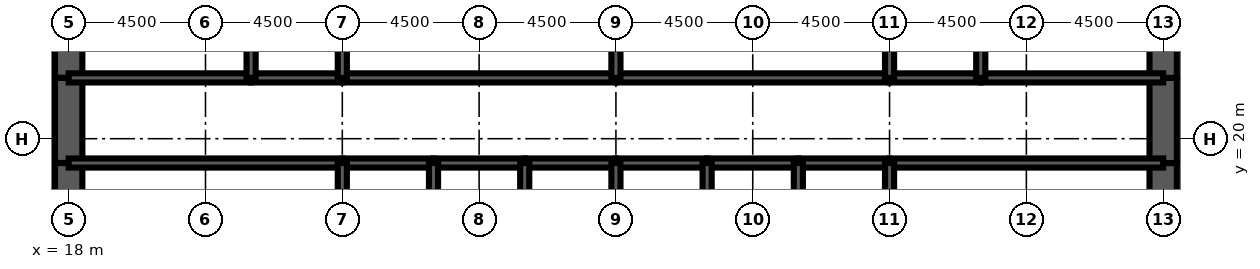
"""IFC4 building model, lengths in metres.
Left out: names, types, materials, properties, quantities, classifications, styles, units other than length and angle.
Written with IfcOpenShell. Run it as: python <this file> out.ifc"""

import sys

from ifc_helpers import new_model, si_unit, direction, frame, frame_2d, origin, place, context, subcontext, project, spatial, rectangle, extrude, element, fill, save


model = new_model("IFC4")
c1 = context("Model", 3, precision=1e-05, world=origin(), true_north=direction((0.0, 1.0)))
c2 = subcontext(c1, "Body", "Model", "MODEL_VIEW")
j1 = project(units=[si_unit("LENGTHUNIT", "METRE"), si_unit("PLANEANGLEUNIT", "RADIAN")], contexts=[c1])
p1 = place(None, origin())
s1 = spatial("IfcSite", under=j1, at=p1, CompositionType="ELEMENT")
p2 = place(p1, origin())
s2 = spatial("IfcBuilding", under=s1, at=p2, CompositionType="ELEMENT")
p3 = place(p2, frame((0.0, 0.0, 27.5)))
s3 = spatial("IfcBuildingStorey", under=s2, at=p3, CompositionType="ELEMENT", Elevation=27.5)
p4 = place(p3, frame((18.0, 26.0, 0.0), z_axis=(0.0, 0.0, 1.0), x_axis=(0.0, -1.0, 0.0)))
e1 = element("IfcWall", 1, at=p4, inside=s3, PredefinedType="SHEAR", context=c2, shape_type="SweptSolid", body=[
    extrude(rectangle(XDim=4.0, YDim=0.9, at=frame_2d((2.0, 0.0))), origin(), (0.0, 0.0, 1.0), 4.5),
])
p5 = place(p3, frame((18.0, 22.0, 0.0), z_axis=(0.0, 0.0, 1.0), x_axis=(0.0, -1.0, 0.0)))
e2 = element("IfcWall", 2, at=p5, inside=s3, PredefinedType="SHEAR", context=c2, shape_type="SweptSolid", body=[
    extrude(rectangle(XDim=2.8, YDim=0.9, at=frame_2d((1.4, 0.0))), origin(), (0.0, 0.0, 1.0), 4.5),
])
p6 = place(p5, frame((0.6, 0.0, 0.0)))
e3 = element("IfcOpeningElement", 3, at=p6, cuts=e2, PredefinedType="OPENING", context=c2, shape_type="SweptSolid", body=[
    extrude(rectangle(XDim=1.8, YDim=2.1, at=frame_2d((0.9, 1.05))), frame((0.0, 0.46, 0.0), z_axis=(0.0, -1.0, 0.0), x_axis=(1.0, 0.0, 0.0)), (0.0, 0.0, 1.0), 0.92),
])
for number, where, z_axis, x_axis in (
    (4, (18.0, 19.2, 0.0), (0.0, 0.0, 1.0), (0.0, -1.0, 0.0)),
    (5, (54.0, 16.0, 0.0), (0.0, 0.0, 1.0), (0.0, 1.0, 0.0)),
):
    element("IfcWall", number, at=place(p3, frame(where, z_axis=z_axis, x_axis=x_axis)), inside=s3, PredefinedType="SHEAR", context=c2, shape_type="SweptSolid", body=[
        extrude(rectangle(XDim=3.2, YDim=0.9, at=frame_2d((1.6, 0.0))), origin(), (0.0, 0.0, 1.0), 4.5),
    ])
p7 = place(p3, frame((54.0, 19.2, 0.0), z_axis=(0.0, 0.0, 1.0), x_axis=(0.0, 1.0, 0.0)))
e6 = element("IfcWall", 6, at=p7, inside=s3, PredefinedType="SHEAR", context=c2, shape_type="SweptSolid", body=[
    extrude(rectangle(XDim=2.8, YDim=0.9, at=frame_2d((1.4, 0.0))), origin(), (0.0, 0.0, 1.0), 4.5),
])
p8 = place(p7, frame((0.4, 0.0, 0.0)))
e7 = element("IfcOpeningElement", 7, at=p8, cuts=e6, PredefinedType="OPENING", context=c2, shape_type="SweptSolid", body=[
    extrude(rectangle(XDim=1.8, YDim=2.1, at=frame_2d((0.9, 1.05))), frame((0.0, 0.46, 0.0), z_axis=(0.0, -1.0, 0.0), x_axis=(1.0, 0.0, 0.0)), (0.0, 0.0, 1.0), 0.92),
])
p9 = place(p3, frame((54.0, 22.0, 0.0), z_axis=(0.0, 0.0, 1.0), x_axis=(0.0, 1.0, 0.0)))
e8 = element("IfcWall", 8, at=p9, inside=s3, PredefinedType="SHEAR", context=c2, shape_type="SweptSolid", body=[
    extrude(rectangle(XDim=4.0, YDim=0.9, at=frame_2d((2.0, 0.0))), origin(), (0.0, 0.0, 1.0), 4.5),
])
p10 = place(p3, frame((18.0, 19.2, 0.0), z_axis=(0.0, 0.0, 1.0), x_axis=(1.0, 0.0, 0.0)))
e9 = element("IfcWall", 9, at=p10, inside=s3, PredefinedType="SOLIDWALL", context=c2, shape_type="SweptSolid", body=[
    extrude(rectangle(XDim=9.0, YDim=0.3, at=frame_2d((4.5, 0.0))), origin(), (0.0, 0.0, 1.0), 4.5),
])
p11 = place(p10, frame((0.65, 0.0, 0.0)))
e10 = element("IfcOpeningElement", 10, at=p11, cuts=e9, PredefinedType="OPENING", context=c2, shape_type="SweptSolid", body=[
    extrude(rectangle(XDim=1.0, YDim=2.1, at=frame_2d((0.5, 1.05))), frame((0.0, 0.16, 0.0), z_axis=(0.0, -1.0, 0.0), x_axis=(1.0, 0.0, 0.0)), (0.0, 0.0, 1.0), 0.32),
])
p12 = place(p3, frame((27.0, 19.2, 0.0), z_axis=(0.0, 0.0, 1.0), x_axis=(1.0, 0.0, 0.0)))
e11 = element("IfcWall", 11, at=p12, inside=s3, PredefinedType="SOLIDWALL", context=c2, shape_type="SweptSolid", body=[
    extrude(rectangle(XDim=3.0, YDim=0.3, at=frame_2d((1.5, 0.0))), origin(), (0.0, 0.0, 1.0), 4.5),
])
p13 = place(p12, frame((0.95, 0.0, 0.0)))
e12 = element("IfcOpeningElement", 12, at=p13, cuts=e11, PredefinedType="OPENING", context=c2, shape_type="SweptSolid", body=[
    extrude(rectangle(XDim=1.1, YDim=2.2, at=frame_2d((0.55, 1.1))), frame((0.0, 0.16, 0.0), z_axis=(0.0, -1.0, 0.0), x_axis=(1.0, 0.0, 0.0)), (0.0, 0.0, 1.0), 0.32),
])
p14 = place(p3, frame((30.0, 19.2, 0.0), z_axis=(0.0, 0.0, 1.0), x_axis=(1.0, 0.0, 0.0)))
e13 = element("IfcWall", 13, at=p14, inside=s3, PredefinedType="SOLIDWALL", context=c2, shape_type="SweptSolid", body=[
    extrude(rectangle(XDim=3.0, YDim=0.3, at=frame_2d((1.5, 0.0))), origin(), (0.0, 0.0, 1.0), 4.5),
])
p15 = place(p14, frame((0.95, 0.0, 0.0)))
e14 = element("IfcOpeningElement", 14, at=p15, cuts=e13, PredefinedType="OPENING", context=c2, shape_type="SweptSolid", body=[
    extrude(rectangle(XDim=1.1, YDim=2.2, at=frame_2d((0.55, 1.1))), frame((0.0, 0.16, 0.0), z_axis=(0.0, -1.0, 0.0), x_axis=(1.0, 0.0, 0.0)), (0.0, 0.0, 1.0), 0.32),
])
p16 = place(p3, frame((33.0, 19.2, 0.0), z_axis=(0.0, 0.0, 1.0), x_axis=(1.0, 0.0, 0.0)))
e15 = element("IfcWall", 15, at=p16, inside=s3, PredefinedType="SOLIDWALL", context=c2, shape_type="SweptSolid", body=[
    extrude(rectangle(XDim=3.0, YDim=0.3, at=frame_2d((1.5, 0.0))), origin(), (0.0, 0.0, 1.0), 4.5),
])
p17 = place(p16, frame((0.95, 0.0, 0.0)))
e16 = element("IfcOpeningElement", 16, at=p17, cuts=e15, PredefinedType="OPENING", context=c2, shape_type="SweptSolid", body=[
    extrude(rectangle(XDim=1.1, YDim=2.2, at=frame_2d((0.55, 1.1))), frame((0.0, 0.16, 0.0), z_axis=(0.0, -1.0, 0.0), x_axis=(1.0, 0.0, 0.0)), (0.0, 0.0, 1.0), 0.32),
])
p18 = place(p3, frame((36.0, 19.2, 0.0), z_axis=(0.0, 0.0, 1.0), x_axis=(1.0, 0.0, 0.0)))
e17 = element("IfcWall", 17, at=p18, inside=s3, PredefinedType="SOLIDWALL", context=c2, shape_type="SweptSolid", body=[
    extrude(rectangle(XDim=3.0, YDim=0.3, at=frame_2d((1.5, 0.0))), origin(), (0.0, 0.0, 1.0), 4.5),
])
p19 = place(p18, frame((0.95, 0.0, 0.0)))
e18 = element("IfcOpeningElement", 18, at=p19, cuts=e17, PredefinedType="OPENING", context=c2, shape_type="SweptSolid", body=[
    extrude(rectangle(XDim=1.1, YDim=2.2, at=frame_2d((0.55, 1.1))), frame((0.0, 0.16, 0.0), z_axis=(0.0, -1.0, 0.0), x_axis=(1.0, 0.0, 0.0)), (0.0, 0.0, 1.0), 0.32),
])
for number, where, z_axis, x_axis in (
    (19, (39.0, 19.2, 0.0), (0.0, 0.0, 1.0), (1.0, 0.0, 0.0)),
    (20, (42.0, 19.2, 0.0), (0.0, 0.0, 1.0), (1.0, 0.0, 0.0)),
):
    element("IfcWall", number, at=place(p3, frame(where, z_axis=z_axis, x_axis=x_axis)), inside=s3, PredefinedType="SOLIDWALL", context=c2, shape_type="SweptSolid", body=[
        extrude(rectangle(XDim=3.0, YDim=0.3, at=frame_2d((1.5, 0.0))), origin(), (0.0, 0.0, 1.0), 4.5),
    ])
p20 = place(p3, frame((45.0, 19.2, 0.0), z_axis=(0.0, 0.0, 1.0), x_axis=(1.0, 0.0, 0.0)))
e21 = element("IfcWall", 21, at=p20, inside=s3, PredefinedType="SOLIDWALL", context=c2, shape_type="SweptSolid", body=[
    extrude(rectangle(XDim=9.0, YDim=0.3, at=frame_2d((4.5, 0.0))), origin(), (0.0, 0.0, 1.0), 4.5),
])
p21 = place(p20, frame((7.35, 0.0, 0.0)))
e22 = element("IfcOpeningElement", 22, at=p21, cuts=e21, PredefinedType="OPENING", context=c2, shape_type="SweptSolid", body=[
    extrude(rectangle(XDim=1.0, YDim=2.1, at=frame_2d((0.5, 1.05))), frame((0.0, 0.16, 0.0), z_axis=(0.0, -1.0, 0.0), x_axis=(1.0, 0.0, 0.0)), (0.0, 0.0, 1.0), 0.32),
])
p22 = place(p3, frame((18.0, 22.0, 0.0), z_axis=(0.0, 0.0, 1.0), x_axis=(1.0, 0.0, 0.0)))
e23 = element("IfcWall", 23, at=p22, inside=s3, PredefinedType="SOLIDWALL", context=c2, shape_type="SweptSolid", body=[
    extrude(rectangle(XDim=6.0, YDim=0.3, at=frame_2d((3.0, 0.0))), origin(), (0.0, 0.0, 1.0), 4.5),
])
p23 = place(p22, frame((4.4, 0.0, 0.0)))
e24 = element("IfcOpeningElement", 24, at=p23, cuts=e23, PredefinedType="OPENING", context=c2, shape_type="SweptSolid", body=[
    extrude(rectangle(XDim=1.0, YDim=2.1, at=frame_2d((0.5, 1.05))), frame((0.0, 0.16, 0.0), z_axis=(0.0, -1.0, 0.0), x_axis=(1.0, 0.0, 0.0)), (0.0, 0.0, 1.0), 0.32),
])
p24 = place(p22, frame((0.85, 0.0, 0.0)))
e25 = element("IfcOpeningElement", 25, at=p24, cuts=e23, PredefinedType="OPENING", context=c2, shape_type="SweptSolid", body=[
    extrude(rectangle(XDim=1.0, YDim=2.1, at=frame_2d((0.5, 1.05))), frame((0.0, 0.16, 0.0), z_axis=(0.0, -1.0, 0.0), x_axis=(1.0, 0.0, 0.0)), (0.0, 0.0, 1.0), 0.32),
])
p25 = place(p3, frame((24.0, 22.0, 0.0), z_axis=(0.0, 0.0, 1.0), x_axis=(1.0, 0.0, 0.0)))
e26 = element("IfcWall", 26, at=p25, inside=s3, PredefinedType="SOLIDWALL", context=c2, shape_type="SweptSolid", body=[
    extrude(rectangle(XDim=3.0, YDim=0.3, at=frame_2d((1.5, 0.0))), origin(), (0.0, 0.0, 1.0), 4.5),
])
p26 = place(p25, frame((1.0, 0.0, 0.0)))
e27 = element("IfcOpeningElement", 27, at=p26, cuts=e26, PredefinedType="OPENING", context=c2, shape_type="SweptSolid", body=[
    extrude(rectangle(XDim=1.0, YDim=2.1, at=frame_2d((0.5, 1.05))), frame((0.0, 0.16, 0.0), z_axis=(0.0, -1.0, 0.0), x_axis=(1.0, 0.0, 0.0)), (0.0, 0.0, 1.0), 0.32),
])
p27 = place(p3, frame((27.0, 22.0, 0.0), z_axis=(0.0, 0.0, 1.0), x_axis=(1.0, 0.0, 0.0)))
e28 = element("IfcWall", 28, at=p27, inside=s3, PredefinedType="SOLIDWALL", context=c2, shape_type="SweptSolid", body=[
    extrude(rectangle(XDim=9.0, YDim=0.3, at=frame_2d((4.5, 0.0))), origin(), (0.0, 0.0, 1.0), 4.5),
])
p28 = place(p27, frame((4.0, 0.0, 0.0)))
e29 = element("IfcOpeningElement", 29, at=p28, cuts=e28, PredefinedType="OPENING", context=c2, shape_type="SweptSolid", body=[
    extrude(rectangle(XDim=1.0, YDim=2.1, at=frame_2d((0.5, 1.05))), frame((0.0, 0.16, 0.0), z_axis=(0.0, -1.0, 0.0), x_axis=(1.0, 0.0, 0.0)), (0.0, 0.0, 1.0), 0.32),
])
p29 = place(p3, frame((36.0, 22.0, 0.0), z_axis=(0.0, 0.0, 1.0), x_axis=(1.0, 0.0, 0.0)))
e30 = element("IfcWall", 30, at=p29, inside=s3, PredefinedType="SOLIDWALL", context=c2, shape_type="SweptSolid", body=[
    extrude(rectangle(XDim=9.0, YDim=0.3, at=frame_2d((4.5, 0.0))), origin(), (0.0, 0.0, 1.0), 4.5),
])
p30 = place(p29, frame((4.0, 0.0, 0.0)))
e31 = element("IfcOpeningElement", 31, at=p30, cuts=e30, PredefinedType="OPENING", context=c2, shape_type="SweptSolid", body=[
    extrude(rectangle(XDim=1.0, YDim=2.1, at=frame_2d((0.5, 1.05))), frame((0.0, 0.16, 0.0), z_axis=(0.0, -1.0, 0.0), x_axis=(1.0, 0.0, 0.0)), (0.0, 0.0, 1.0), 0.32),
])
p31 = place(p3, frame((45.0, 22.0, 0.0), z_axis=(0.0, 0.0, 1.0), x_axis=(1.0, 0.0, 0.0)))
e32 = element("IfcWall", 32, at=p31, inside=s3, PredefinedType="SOLIDWALL", context=c2, shape_type="SweptSolid", body=[
    extrude(rectangle(XDim=3.0, YDim=0.3, at=frame_2d((1.5, 0.0))), origin(), (0.0, 0.0, 1.0), 4.5),
])
p32 = place(p31, frame((1.0, 0.0, 0.0)))
e33 = element("IfcOpeningElement", 33, at=p32, cuts=e32, PredefinedType="OPENING", context=c2, shape_type="SweptSolid", body=[
    extrude(rectangle(XDim=1.0, YDim=2.1, at=frame_2d((0.5, 1.05))), frame((0.0, 0.16, 0.0), z_axis=(0.0, -1.0, 0.0), x_axis=(1.0, 0.0, 0.0)), (0.0, 0.0, 1.0), 0.32),
])
p33 = place(p3, frame((48.0, 22.0, 0.0), z_axis=(0.0, 0.0, 1.0), x_axis=(1.0, 0.0, 0.0)))
e34 = element("IfcWall", 34, at=p33, inside=s3, PredefinedType="SOLIDWALL", context=c2, shape_type="SweptSolid", body=[
    extrude(rectangle(XDim=6.0, YDim=0.3, at=frame_2d((3.0, 0.0))), origin(), (0.0, 0.0, 1.0), 4.5),
])
p34 = place(p33, frame((2.0, 0.0, 0.0)))
e35 = element("IfcOpeningElement", 35, at=p34, cuts=e34, PredefinedType="OPENING", context=c2, shape_type="SweptSolid", body=[
    extrude(rectangle(XDim=1.0, YDim=2.1, at=frame_2d((0.5, 1.05))), frame((0.0, 0.16, 0.0), z_axis=(0.0, -1.0, 0.0), x_axis=(1.0, 0.0, 0.0)), (0.0, 0.0, 1.0), 0.32),
])
p35 = place(p33, frame((4.3, 0.0, 0.0)))
e36 = element("IfcOpeningElement", 36, at=p35, cuts=e34, PredefinedType="OPENING", context=c2, shape_type="SweptSolid", body=[
    extrude(rectangle(XDim=1.0, YDim=2.1, at=frame_2d((0.5, 1.05))), frame((0.0, 0.16, 0.0), z_axis=(0.0, -1.0, 0.0), x_axis=(1.0, 0.0, 0.0)), (0.0, 0.0, 1.0), 0.32),
])
for number, where, z_axis, x_axis in (
    (37, (27.0, 16.0, 0.0), (0.0, 0.0, 1.0), (0.0, 1.0, 0.0)),
    (38, (30.0, 16.0, 0.0), (0.0, 0.0, 1.0), (0.0, 1.0, 0.0)),
    (39, (33.0, 16.0, 0.0), (0.0, 0.0, 1.0), (0.0, 1.0, 0.0)),
    (40, (36.0, 16.0, 0.0), (0.0, 0.0, 1.0), (0.0, 1.0, 0.0)),
    (41, (39.0, 16.0, 0.0), (0.0, 0.0, 1.0), (0.0, 1.0, 0.0)),
    (42, (42.0, 16.0, 0.0), (0.0, 0.0, 1.0), (0.0, 1.0, 0.0)),
    (43, (45.0, 16.0, 0.0), (0.0, 0.0, 1.0), (0.0, 1.0, 0.0)),
):
    element("IfcWall", number, at=place(p3, frame(where, z_axis=z_axis, x_axis=x_axis)), inside=s3, PredefinedType="SOLIDWALL", context=c2, shape_type="SweptSolid", body=[
        extrude(rectangle(XDim=3.2, YDim=0.3, at=frame_2d((1.6, 0.0))), origin(), (0.0, 0.0, 1.0), 4.5),
    ])
for number, where, z_axis, x_axis in (
    (44, (24.0, 22.0, 0.0), (0.0, 0.0, 1.0), (0.0, 1.0, 0.0)),
    (45, (27.0, 22.0, 0.0), (0.0, 0.0, 1.0), (0.0, 1.0, 0.0)),
    (46, (36.0, 22.0, 0.0), (0.0, 0.0, 1.0), (0.0, 1.0, 0.0)),
    (47, (45.0, 22.0, 0.0), (0.0, 0.0, 1.0), (0.0, 1.0, 0.0)),
    (48, (48.0, 22.0, 0.0), (0.0, 0.0, 1.0), (0.0, 1.0, 0.0)),
):
    element("IfcWall", number, at=place(p3, frame(where, z_axis=z_axis, x_axis=x_axis)), inside=s3, PredefinedType="SOLIDWALL", context=c2, shape_type="SweptSolid", body=[
        extrude(rectangle(XDim=4.0, YDim=0.3, at=frame_2d((2.0, 0.0))), origin(), (0.0, 0.0, 1.0), 4.5),
    ])
for number, where, z_axis, x_axis in (
    (49, (20.325, 22.15, 0.0), (0.0, 0.0, 1.0), (0.0, 1.0, 0.0)),
    (50, (51.975, 22.15, 0.0), (0.0, 0.0, 1.0), (0.0, 1.0, 0.0)),
):
    element("IfcWall", number, at=place(p3, frame(where, z_axis=z_axis, x_axis=x_axis)), inside=s3, PredefinedType="PARTITIONING", context=c2, shape_type="SweptSolid", body=[
        extrude(rectangle(XDim=3.7, YDim=0.15, at=frame_2d((1.85, 0.0))), origin(), (0.0, 0.0, 1.0), 3.0),
    ])
p36 = place(p13, origin())
e51 = element("IfcDoor", 51, at=p36, inside=s3, OperationType="DOUBLE_DOOR_SLIDING", PredefinedType="USERDEFINED", context=c2, shape_type="SweptSolid", body=[
    extrude(rectangle(XDim=1.1, YDim=2.2, at=frame_2d((0.55, 1.1))), frame((0.0, 0.025, 0.0), z_axis=(0.0, -1.0, 0.0), x_axis=(1.0, 0.0, 0.0)), (0.0, 0.0, 1.0), 0.05),
])
fill(e12, e51)
p37 = place(p15, origin())
e52 = element("IfcDoor", 52, at=p37, inside=s3, OperationType="DOUBLE_DOOR_SLIDING", PredefinedType="USERDEFINED", context=c2, shape_type="SweptSolid", body=[
    extrude(rectangle(XDim=1.1, YDim=2.2, at=frame_2d((0.55, 1.1))), frame((0.0, 0.025, 0.0), z_axis=(0.0, -1.0, 0.0), x_axis=(1.0, 0.0, 0.0)), (0.0, 0.0, 1.0), 0.05),
])
fill(e14, e52)
p38 = place(p17, origin())
e53 = element("IfcDoor", 53, at=p38, inside=s3, OperationType="DOUBLE_DOOR_SLIDING", PredefinedType="USERDEFINED", context=c2, shape_type="SweptSolid", body=[
    extrude(rectangle(XDim=1.1, YDim=2.2, at=frame_2d((0.55, 1.1))), frame((0.0, 0.025, 0.0), z_axis=(0.0, -1.0, 0.0), x_axis=(1.0, 0.0, 0.0)), (0.0, 0.0, 1.0), 0.05),
])
fill(e16, e53)
p39 = place(p19, origin())
e54 = element("IfcDoor", 54, at=p39, inside=s3, OperationType="DOUBLE_DOOR_SLIDING", PredefinedType="USERDEFINED", context=c2, shape_type="SweptSolid", body=[
    extrude(rectangle(XDim=1.1, YDim=2.2, at=frame_2d((0.55, 1.1))), frame((0.0, 0.025, 0.0), z_axis=(0.0, -1.0, 0.0), x_axis=(1.0, 0.0, 0.0)), (0.0, 0.0, 1.0), 0.05),
])
fill(e18, e54)
p40 = place(p11, origin())
e55 = element("IfcDoor", 55, at=p40, inside=s3, OperationType="SINGLE_SWING_LEFT", PredefinedType="DOOR", context=c2, shape_type="SweptSolid", body=[
    extrude(rectangle(XDim=1.0, YDim=2.1, at=frame_2d((0.5, 1.05))), frame((0.0, 0.025, 0.0), z_axis=(0.0, -1.0, 0.0), x_axis=(1.0, 0.0, 0.0)), (0.0, 0.0, 1.0), 0.05),
])
fill(e10, e55)
p41 = place(p21, origin())
e56 = element("IfcDoor", 56, at=p41, inside=s3, OperationType="SINGLE_SWING_RIGHT", PredefinedType="DOOR", context=c2, shape_type="SweptSolid", body=[
    extrude(rectangle(XDim=1.0, YDim=2.1, at=frame_2d((0.5, 1.05))), frame((0.0, 0.025, 0.0), z_axis=(0.0, -1.0, 0.0), x_axis=(1.0, 0.0, 0.0)), (0.0, 0.0, 1.0), 0.05),
])
fill(e22, e56)
p42 = place(p6, origin())
e57 = element("IfcDoor", 57, at=p42, inside=s3, OperationType="SINGLE_SWING_LEFT", PredefinedType="DOOR", context=c2, shape_type="SweptSolid", body=[
    extrude(rectangle(XDim=1.8, YDim=2.1, at=frame_2d((0.9, 1.05))), frame((0.0, 0.45, 0.0), z_axis=(0.0, -1.0, 0.0), x_axis=(1.0, 0.0, 0.0)), (0.0, 0.0, 1.0), 0.899),
])
fill(e3, e57)
p43 = place(p8, origin())
e58 = element("IfcDoor", 58, at=p43, inside=s3, OperationType="SINGLE_SWING_LEFT", PredefinedType="DOOR", context=c2, shape_type="SweptSolid", body=[
    extrude(rectangle(XDim=1.8, YDim=2.1, at=frame_2d((0.9, 1.05))), frame((0.0, 0.45, 0.0), z_axis=(0.0, -1.0, 0.0), x_axis=(1.0, 0.0, 0.0)), (0.0, 0.0, 1.0), 0.899),
])
fill(e7, e58)
p44 = place(p23, origin())
e59 = element("IfcDoor", 59, at=p44, inside=s3, OperationType="SINGLE_SWING_RIGHT", PredefinedType="DOOR", context=c2, shape_type="SweptSolid", body=[
    extrude(rectangle(XDim=1.0, YDim=2.1, at=frame_2d((0.5, 1.05))), frame((0.0, 0.025, 0.0), z_axis=(0.0, -1.0, 0.0), x_axis=(1.0, 0.0, 0.0)), (0.0, 0.0, 1.0), 0.05),
])
fill(e24, e59)
p45 = place(p26, origin())
e60 = element("IfcDoor", 60, at=p45, inside=s3, OperationType="SINGLE_SWING_LEFT", PredefinedType="DOOR", context=c2, shape_type="SweptSolid", body=[
    extrude(rectangle(XDim=1.0, YDim=2.1, at=frame_2d((0.5, 1.05))), frame((0.0, 0.025, 0.0), z_axis=(0.0, -1.0, 0.0), x_axis=(1.0, 0.0, 0.0)), (0.0, 0.0, 1.0), 0.05),
])
fill(e27, e60)
p46 = place(p28, origin())
e61 = element("IfcDoor", 61, at=p46, inside=s3, OperationType="SINGLE_SWING_LEFT", PredefinedType="DOOR", context=c2, shape_type="SweptSolid", body=[
    extrude(rectangle(XDim=1.0, YDim=2.1, at=frame_2d((0.5, 1.05))), frame((0.0, 0.025, 0.0), z_axis=(0.0, -1.0, 0.0), x_axis=(1.0, 0.0, 0.0)), (0.0, 0.0, 1.0), 0.05),
])
fill(e29, e61)
p47 = place(p30, origin())
e62 = element("IfcDoor", 62, at=p47, inside=s3, OperationType="SINGLE_SWING_LEFT", PredefinedType="DOOR", context=c2, shape_type="SweptSolid", body=[
    extrude(rectangle(XDim=1.0, YDim=2.1, at=frame_2d((0.5, 1.05))), frame((0.0, 0.025, 0.0), z_axis=(0.0, -1.0, 0.0), x_axis=(1.0, 0.0, 0.0)), (0.0, 0.0, 1.0), 0.05),
])
fill(e31, e62)
p48 = place(p32, origin())
e63 = element("IfcDoor", 63, at=p48, inside=s3, OperationType="SINGLE_SWING_LEFT", PredefinedType="DOOR", context=c2, shape_type="SweptSolid", body=[
    extrude(rectangle(XDim=1.0, YDim=2.1, at=frame_2d((0.5, 1.05))), frame((0.0, 0.025, 0.0), z_axis=(0.0, -1.0, 0.0), x_axis=(1.0, 0.0, 0.0)), (0.0, 0.0, 1.0), 0.05),
])
fill(e33, e63)
p49 = place(p34, origin())
e64 = element("IfcDoor", 64, at=p49, inside=s3, OperationType="SINGLE_SWING_LEFT", PredefinedType="DOOR", context=c2, shape_type="SweptSolid", body=[
    extrude(rectangle(XDim=1.0, YDim=2.1, at=frame_2d((0.5, 1.05))), frame((0.0, 0.025, 0.0), z_axis=(0.0, -1.0, 0.0), x_axis=(1.0, 0.0, 0.0)), (0.0, 0.0, 1.0), 0.05),
])
fill(e35, e64)
p50 = place(p24, origin())
e65 = element("IfcDoor", 65, at=p50, inside=s3, OperationType="SINGLE_SWING_LEFT", PredefinedType="DOOR", context=c2, shape_type="SweptSolid", body=[
    extrude(rectangle(XDim=1.0, YDim=2.1, at=frame_2d((0.5, 1.05))), frame((0.0, 0.025, 0.0), z_axis=(0.0, -1.0, 0.0), x_axis=(1.0, 0.0, 0.0)), (0.0, 0.0, 1.0), 0.05),
])
fill(e25, e65)
p51 = place(p35, origin())
e66 = element("IfcDoor", 66, at=p51, inside=s3, OperationType="SINGLE_SWING_RIGHT", PredefinedType="DOOR", context=c2, shape_type="SweptSolid", body=[
    extrude(rectangle(XDim=1.0, YDim=2.1, at=frame_2d((0.5, 1.05))), frame((0.0, 0.025, 0.0), z_axis=(0.0, -1.0, 0.0), x_axis=(1.0, 0.0, 0.0)), (0.0, 0.0, 1.0), 0.05),
])
fill(e36, e66)
save(model, sys.argv[1])
